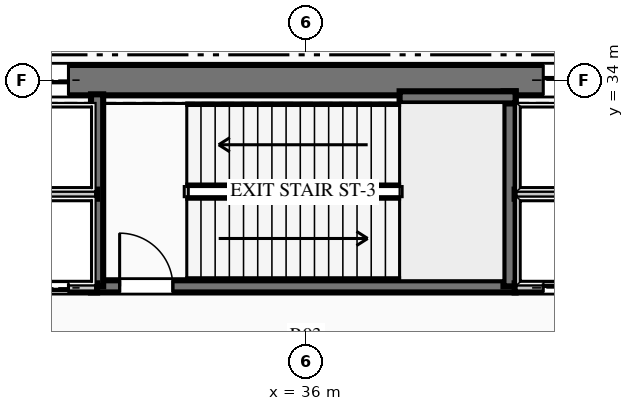
"""IFC4 building model, lengths in metres.
Left out: names, types, materials, properties, quantities, classifications, styles, units other than length and angle.
Written with IfcOpenShell. Run it as: python <this file> out.ifc"""

import sys

from ifc_helpers import new_model, si_unit, direction, frame, frame_2d, origin, place, context, subcontext, project, spatial, rectangle, extrude, element, fill, save


model = new_model("IFC4")
c1 = context("Model", 3, precision=1e-05, world=origin(), true_north=direction((0.0, 1.0)))
c2 = subcontext(c1, "Body", "Model", "MODEL_VIEW")
j1 = project(units=[si_unit("LENGTHUNIT", "METRE"), si_unit("PLANEANGLEUNIT", "RADIAN")], contexts=[c1])
p1 = place(None, origin())
s1 = spatial("IfcSite", under=j1, at=p1, CompositionType="ELEMENT")
p2 = place(p1, origin())
s2 = spatial("IfcBuilding", under=s1, at=p2, CompositionType="ELEMENT")
p3 = place(p2, frame((0.0, 0.0, 6.0)))
s3 = spatial("IfcBuildingStorey", under=s2, at=p3, CompositionType="ELEMENT", Elevation=6.0)
p4 = place(p3, frame((26.7, 34.0, 0.0), z_axis=(0.0, 0.0, 1.0), x_axis=(1.0, 0.0, 0.0)))
e1 = element("IfcWall", 1, at=p4, inside=s3, PredefinedType="SHEAR", context=c2, shape_type="SweptSolid", body=[
    extrude(rectangle(XDim=18.6, YDim=0.6, at=frame_2d((9.3, 0.0))), origin(), (0.0, 0.0, 1.0), 5.4),
])
p5 = place(p4, frame((1.265, 0.0, 0.0)))
e2 = element("IfcOpeningElement", 2, at=p5, cuts=e1, PredefinedType="OPENING", context=c2, shape_type="SweptSolid", body=[
    extrude(rectangle(XDim=1.1, YDim=2.15, at=frame_2d((0.55, 1.075))), frame((0.0, 0.31, 0.0), z_axis=(0.0, -1.0, 0.0), x_axis=(1.0, 0.0, 0.0)), (0.0, 0.0, 1.0), 0.62),
])
p6 = place(p4, frame((3.515, 0.0, 0.0)))
e3 = element("IfcOpeningElement", 3, at=p6, cuts=e1, PredefinedType="OPENING", context=c2, shape_type="SweptSolid", body=[
    extrude(rectangle(XDim=1.1, YDim=2.15, at=frame_2d((0.55, 1.075))), frame((0.0, 0.31, 0.0), z_axis=(0.0, -1.0, 0.0), x_axis=(1.0, 0.0, 0.0)), (0.0, 0.0, 1.0), 0.62),
])
p7 = place(p4, frame((13.985, 0.0, 0.0)))
e4 = element("IfcOpeningElement", 4, at=p7, cuts=e1, PredefinedType="OPENING", context=c2, shape_type="SweptSolid", body=[
    extrude(rectangle(XDim=1.1, YDim=2.15, at=frame_2d((0.55, 1.075))), frame((0.0, 0.31, 0.0), z_axis=(0.0, -1.0, 0.0), x_axis=(1.0, 0.0, 0.0)), (0.0, 0.0, 1.0), 0.62),
])
p8 = place(p4, frame((16.235, 0.0, 0.0)))
e5 = element("IfcOpeningElement", 5, at=p8, cuts=e1, PredefinedType="OPENING", context=c2, shape_type="SweptSolid", body=[
    extrude(rectangle(XDim=1.1, YDim=2.15, at=frame_2d((0.55, 1.075))), frame((0.0, 0.31, 0.0), z_axis=(0.0, -1.0, 0.0), x_axis=(1.0, 0.0, 0.0)), (0.0, 0.0, 1.0), 0.62),
])
p9 = place(p3, frame((31.76, 29.93, 0.0), z_axis=(0.0, 0.0, 1.0), x_axis=(1.0, 0.0, 0.0)))
e6 = element("IfcWall", 6, at=p9, inside=s3, PredefinedType="SHEAR", context=c2, shape_type="SweptSolid", body=[
    extrude(rectangle(XDim=8.38, YDim=0.24, at=frame_2d((4.19, 0.0))), origin(), (0.0, 0.0, 1.0), 5.4),
])
p10 = place(p9, frame((0.565, 0.0, 0.0)))
e7 = element("IfcOpeningElement", 7, at=p10, cuts=e6, PredefinedType="OPENING", context=c2, shape_type="SweptSolid", body=[
    extrude(rectangle(XDim=1.05, YDim=2.15, at=frame_2d((0.525, 1.075))), frame((0.0, 0.13, 0.0), z_axis=(0.0, -1.0, 0.0), x_axis=(1.0, 0.0, 0.0)), (0.0, 0.0, 1.0), 0.26),
])
p11 = place(p3, frame((31.88, 29.93, 0.0), z_axis=(0.0, 0.0, 1.0), x_axis=(0.0, 1.0, 0.0)))
e8 = element("IfcWall", 8, at=p11, inside=s3, PredefinedType="SHEAR", context=c2, shape_type="SweptSolid", body=[
    extrude(rectangle(XDim=3.79, YDim=0.24, at=frame_2d((1.895, 0.0))), origin(), (0.0, 0.0, 1.0), 5.4),
])
p12 = place(p3, frame((40.02, 29.93, 0.0), z_axis=(0.0, 0.0, 1.0), x_axis=(0.0, 1.0, 0.0)))
e9 = element("IfcWall", 9, at=p12, inside=s3, PredefinedType="SHEAR", context=c2, shape_type="SweptSolid", body=[
    extrude(rectangle(XDim=3.85, YDim=0.24, at=frame_2d((1.925, 0.0))), origin(), (0.0, 0.0, 1.0), 5.4),
])
p13 = place(p3, frame((37.85, 33.66, 0.0), z_axis=(0.0, 0.0, 1.0), x_axis=(1.0, 0.0, 0.0)))
e10 = element("IfcWall", 10, at=p13, inside=s3, PredefinedType="SHEAR", context=c2, shape_type="SweptSolid", body=[
    extrude(rectangle(XDim=2.29, YDim=0.24, at=frame_2d((1.145, 0.0))), origin(), (0.0, 0.0, 1.0), 5.4),
])
p14 = place(p3, frame((27.45, 29.9, 0.0), z_axis=(0.0, 0.0, 1.0), x_axis=(1.0, 0.0, 0.0)))
e11 = element("IfcWall", 11, at=p14, inside=s3, PredefinedType="PARTITIONING", context=c2, shape_type="SweptSolid", body=[
    extrude(rectangle(XDim=4.43, YDim=0.18, at=frame_2d((2.215, 0.0))), origin(), (0.0, 0.0, 1.0), 5.07),
])
p15 = place(p14, frame((0.515, 0.0, 0.0)))
e12 = element("IfcOpeningElement", 12, at=p15, cuts=e11, PredefinedType="OPENING", context=c2, shape_type="SweptSolid", body=[
    extrude(rectangle(XDim=1.1, YDim=2.15, at=frame_2d((0.55, 1.075))), frame((0.0, 0.1, 0.0), z_axis=(0.0, -1.0, 0.0), x_axis=(1.0, 0.0, 0.0)), (0.0, 0.0, 1.0), 0.2),
])
p16 = place(p14, frame((2.765, 0.0, 0.0)))
e13 = element("IfcOpeningElement", 13, at=p16, cuts=e11, PredefinedType="OPENING", context=c2, shape_type="SweptSolid", body=[
    extrude(rectangle(XDim=1.1, YDim=2.15, at=frame_2d((0.55, 1.075))), frame((0.0, 0.1, 0.0), z_axis=(0.0, -1.0, 0.0), x_axis=(1.0, 0.0, 0.0)), (0.0, 0.0, 1.0), 0.2),
])
p17 = place(p3, frame((27.45, 31.75, 0.0), z_axis=(0.0, 0.0, 1.0), x_axis=(1.0, 0.0, 0.0)))
e14 = element("IfcWall", 14, at=p17, inside=s3, PredefinedType="PARTITIONING", context=c2, shape_type="SweptSolid", body=[
    extrude(rectangle(XDim=4.43, YDim=0.18, at=frame_2d((2.215, 0.0))), origin(), (0.0, 0.0, 1.0), 5.07),
])
p18 = place(p3, frame((40.12, 29.9, 0.0), z_axis=(0.0, 0.0, 1.0), x_axis=(1.0, 0.0, 0.0)))
e15 = element("IfcWall", 15, at=p18, inside=s3, PredefinedType="PARTITIONING", context=c2, shape_type="SweptSolid", body=[
    extrude(rectangle(XDim=4.43, YDim=0.18, at=frame_2d((2.215, 0.0))), origin(), (0.0, 0.0, 1.0), 5.07),
])
p19 = place(p18, frame((0.565, 0.0, 0.0)))
e16 = element("IfcOpeningElement", 16, at=p19, cuts=e15, PredefinedType="OPENING", context=c2, shape_type="SweptSolid", body=[
    extrude(rectangle(XDim=1.1, YDim=2.15, at=frame_2d((0.55, 1.075))), frame((0.0, 0.1, 0.0), z_axis=(0.0, -1.0, 0.0), x_axis=(1.0, 0.0, 0.0)), (0.0, 0.0, 1.0), 0.2),
])
p20 = place(p18, frame((2.815, 0.0, 0.0)))
e17 = element("IfcOpeningElement", 17, at=p20, cuts=e15, PredefinedType="OPENING", context=c2, shape_type="SweptSolid", body=[
    extrude(rectangle(XDim=1.1, YDim=2.15, at=frame_2d((0.55, 1.075))), frame((0.0, 0.1, 0.0), z_axis=(0.0, -1.0, 0.0), x_axis=(1.0, 0.0, 0.0)), (0.0, 0.0, 1.0), 0.2),
])
p21 = place(p3, frame((40.12, 31.75, 0.0), z_axis=(0.0, 0.0, 1.0), x_axis=(1.0, 0.0, 0.0)))
e18 = element("IfcWall", 18, at=p21, inside=s3, PredefinedType="PARTITIONING", context=c2, shape_type="SweptSolid", body=[
    extrude(rectangle(XDim=4.43, YDim=0.18, at=frame_2d((2.215, 0.0))), origin(), (0.0, 0.0, 1.0), 5.07),
])
p22 = place(p10, origin())
e19 = element("IfcDoor", 19, at=p22, inside=s3, OperationType="SINGLE_SWING_LEFT", PredefinedType="DOOR", context=c2, shape_type="SweptSolid", body=[
    extrude(rectangle(XDim=1.05, YDim=2.15, at=frame_2d((0.525, 1.075))), frame((0.0, 0.025, 0.0), z_axis=(0.0, -1.0, 0.0), x_axis=(1.0, 0.0, 0.0)), (0.0, 0.0, 1.0), 0.05),
])
fill(e7, e19)
p23 = place(p16, origin())
e20 = element("IfcDoor", 20, at=p23, inside=s3, OperationType="SLIDING_TO_LEFT", PredefinedType="DOOR", context=c2, shape_type="SweptSolid", body=[
    extrude(rectangle(XDim=1.1, YDim=2.15, at=frame_2d((0.55, 1.075))), frame((0.0, 0.025, 0.0), z_axis=(0.0, -1.0, 0.0), x_axis=(1.0, 0.0, 0.0)), (0.0, 0.0, 1.0), 0.05),
])
fill(e13, e20)
p24 = place(p6, origin())
e21 = element("IfcDoor", 21, at=p24, inside=s3, OperationType="SLIDING_TO_LEFT", PredefinedType="DOOR", context=c2, shape_type="SweptSolid", body=[
    extrude(rectangle(XDim=1.1, YDim=2.15, at=frame_2d((0.55, 1.075))), frame((0.0, 0.025, 0.0), z_axis=(0.0, -1.0, 0.0), x_axis=(1.0, 0.0, 0.0)), (0.0, 0.0, 1.0), 0.05),
])
fill(e3, e21)
p25 = place(p19, origin())
e22 = element("IfcDoor", 22, at=p25, inside=s3, OperationType="SLIDING_TO_LEFT", PredefinedType="DOOR", context=c2, shape_type="SweptSolid", body=[
    extrude(rectangle(XDim=1.1, YDim=2.15, at=frame_2d((0.55, 1.075))), frame((0.0, 0.025, 0.0), z_axis=(0.0, -1.0, 0.0), x_axis=(1.0, 0.0, 0.0)), (0.0, 0.0, 1.0), 0.05),
])
fill(e16, e22)
p26 = place(p7, origin())
e23 = element("IfcDoor", 23, at=p26, inside=s3, OperationType="SLIDING_TO_LEFT", PredefinedType="DOOR", context=c2, shape_type="SweptSolid", body=[
    extrude(rectangle(XDim=1.1, YDim=2.15, at=frame_2d((0.55, 1.075))), frame((0.0, 0.025, 0.0), z_axis=(0.0, -1.0, 0.0), x_axis=(1.0, 0.0, 0.0)), (0.0, 0.0, 1.0), 0.05),
])
fill(e4, e23)
save(model, sys.argv[1])
